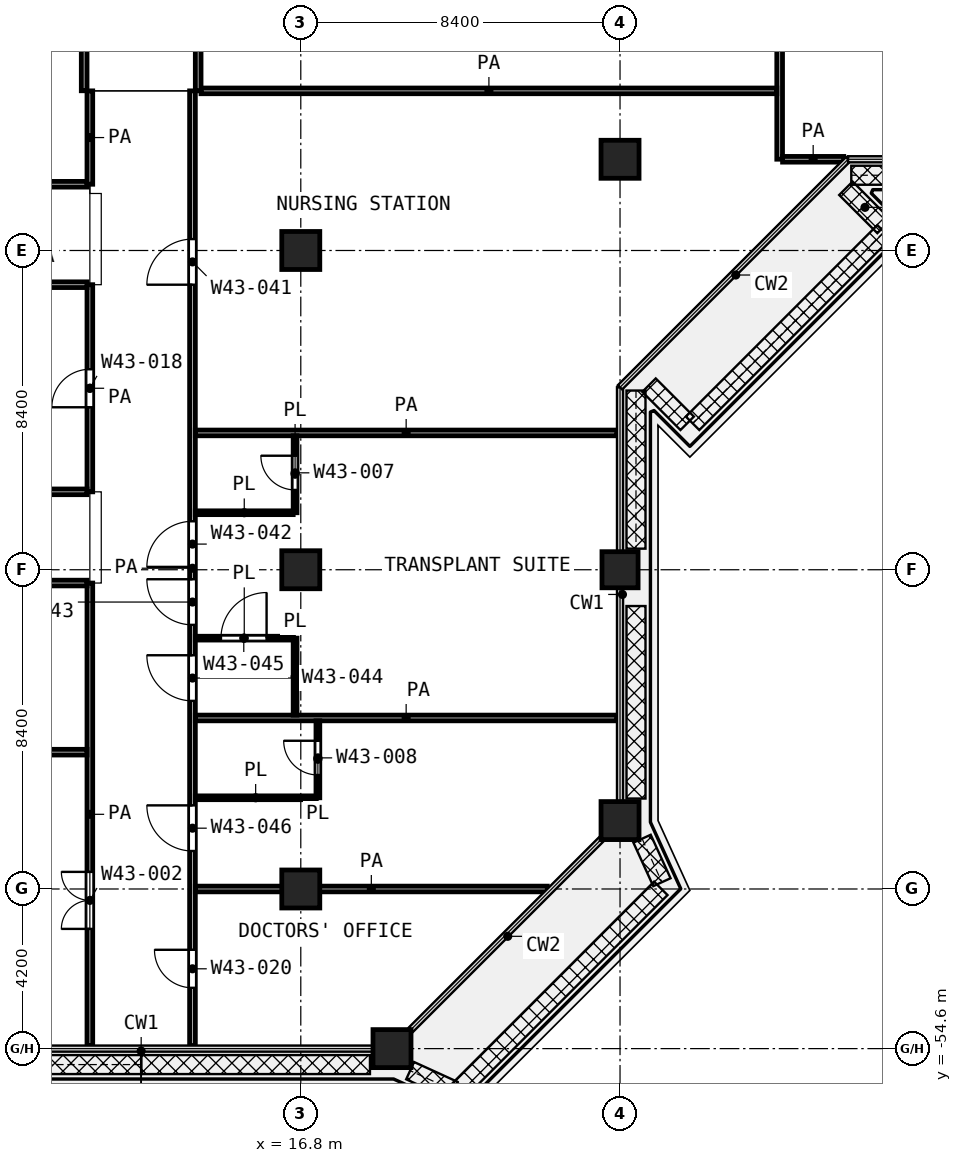
"""IFC4 building model, lengths in metres.
Left out: names, types, materials, properties, quantities, classifications, styles, units other than length and angle.
Written with IfcOpenShell. Run it as: python <this file> out.ifc"""

import sys

from ifc_helpers import new_model, si_unit, direction, frame, frame_2d, origin, origin_2d, place, context, subcontext, project, spatial, rectangle, extrude, element, fill, save


model = new_model("IFC4")
c1 = context("Model", 3, precision=1e-05, world=origin(), true_north=direction((0.0, 1.0)))
c2 = subcontext(c1, "Body", "Model", "MODEL_VIEW")
j1 = project(units=[si_unit("LENGTHUNIT", "METRE"), si_unit("PLANEANGLEUNIT", "RADIAN")], contexts=[c1])
p1 = place(None, origin())
s1 = spatial("IfcSite", under=j1, at=p1, CompositionType="ELEMENT")
p2 = place(p1, origin())
s2 = spatial("IfcBuilding", under=s1, at=p2, CompositionType="ELEMENT")
p3 = place(p2, frame((0.0, 0.0, 208.8)))
s3 = spatial("IfcBuildingStorey", under=s2, at=p3, CompositionType="ELEMENT", Elevation=208.8)
for number, where, z_axis, x_axis in (
    (1, (25.2, -31.2, 0.0), (0.0, 0.0, 1.0), (1.0, 0.0, 0.0)),
    (2, (16.8, -33.6, 0.0), (0.0, 0.0, 1.0), (1.0, 0.0, 0.0)),
    (3, (16.8, -42.0, 0.0), (0.0, 0.0, 1.0), (1.0, 0.0, 0.0)),
):
    element("IfcColumn", number, at=place(p3, frame(where, z_axis=z_axis, x_axis=x_axis)), inside=s3, PredefinedType="COLUMN", context=c2, shape_type="SweptSolid", body=[
        extrude(rectangle(XDim=1.0, YDim=1.0, at=origin_2d()), origin(), (0.0, 0.0, 1.0), 4.2),
    ])
p4 = place(p3, frame((25.2, -42.0, 0.0), z_axis=(0.0, 0.0, 1.0), x_axis=(1.0, 0.0, 0.0)))
e4 = element("IfcColumn", 4, at=p4, inside=s3, PredefinedType="COLUMN", context=c2, shape_type="SweptSolid", body=[
    extrude(rectangle(XDim=0.95, YDim=0.95, at=origin_2d()), origin(), (0.0, 0.0, 1.0), 4.2),
])
for number, where, z_axis, x_axis in (
    (5, (25.2, -48.6, 0.0), (0.0, 0.0, 1.0), (1.0, 0.0, 0.0)),
    (6, (16.8, -50.4, 0.0), (0.0, 0.0, 1.0), (1.0, 0.0, 0.0)),
    (7, (19.2, -54.6, 0.0), (0.0, 0.0, 1.0), (1.0, 0.0, 0.0)),
):
    element("IfcColumn", number, at=place(p3, frame(where, z_axis=z_axis, x_axis=x_axis)), inside=s3, PredefinedType="COLUMN", context=c2, shape_type="SweptSolid", body=[
        extrude(rectangle(XDim=1.0, YDim=1.0, at=origin_2d()), origin(), (0.0, 0.0, 1.0), 4.2),
    ])
p5 = place(p3, frame((14.025, -48.0, 0.0), z_axis=(0.0, 0.0, 1.0), x_axis=(1.0, 0.0, 0.0)))
e8 = element("IfcWall", 8, at=p5, inside=s3, PredefinedType="PARTITIONING", context=c2, shape_type="SweptSolid", body=[
    extrude(rectangle(XDim=3.175, YDim=0.1, at=frame_2d((1.587, 0.0))), origin(), (0.0, 0.0, 1.0), 3.7),
])
p6 = place(p3, frame((14.025, -43.8, 0.0), z_axis=(0.0, 0.0, 1.0), x_axis=(1.0, 0.0, 0.0)))
e9 = element("IfcWall", 9, at=p6, inside=s3, PredefinedType="PARTITIONING", context=c2, shape_type="SweptSolid", body=[
    extrude(rectangle(XDim=2.575, YDim=0.1, at=frame_2d((1.288, 0.0))), origin(), (0.0, 0.0, 1.0), 3.7),
])
p7 = place(p6, frame((0.675, 0.0, 0.0)))
e10 = element("IfcOpeningElement", 10, at=p7, cuts=e9, PredefinedType="OPENING", context=c2, shape_type="SweptSolid", body=[
    extrude(rectangle(XDim=1.2, YDim=2.1, at=frame_2d((0.6, 1.05))), frame((0.0, 0.06, 0.0), z_axis=(0.0, -1.0, 0.0), x_axis=(1.0, 0.0, 0.0)), (0.0, 0.0, 1.0), 0.12),
])
p8 = place(p3, frame((14.025, -40.5, 0.0), z_axis=(0.0, 0.0, 1.0), x_axis=(1.0, 0.0, 0.0)))
e11 = element("IfcWall", 11, at=p8, inside=s3, PredefinedType="PARTITIONING", context=c2, shape_type="SweptSolid", body=[
    extrude(rectangle(XDim=2.575, YDim=0.1, at=frame_2d((1.288, 0.0))), origin(), (0.0, 0.0, 1.0), 3.7),
])
p9 = place(p3, frame((16.65, -45.825, 0.0), z_axis=(0.0, 0.0, 1.0), x_axis=(0.0, 1.0, 0.0)))
e12 = element("IfcWall", 12, at=p9, inside=s3, PredefinedType="PARTITIONING", context=c2, shape_type="SweptSolid", body=[
    extrude(rectangle(XDim=2.025, YDim=0.1, at=frame_2d((1.012, 0.0))), origin(), (0.0, 0.0, 1.0), 3.7),
])
p10 = place(p3, frame((16.65, -40.5, 0.0), z_axis=(0.0, 0.0, 1.0), x_axis=(0.0, 1.0, 0.0)))
e13 = element("IfcWall", 13, at=p10, inside=s3, PredefinedType="PARTITIONING", context=c2, shape_type="SweptSolid", body=[
    extrude(rectangle(XDim=2.025, YDim=0.1, at=frame_2d((1.012, 0.0))), origin(), (0.0, 0.0, 1.0), 3.7),
])
p11 = place(p10, frame((0.6, 0.0, 0.0)))
e14 = element("IfcOpeningElement", 14, at=p11, cuts=e13, PredefinedType="OPENING", context=c2, shape_type="SweptSolid", body=[
    extrude(rectangle(XDim=0.9, YDim=2.1, at=frame_2d((0.45, 1.05))), frame((0.0, 0.06, 0.0), z_axis=(0.0, -1.0, 0.0), x_axis=(1.0, 0.0, 0.0)), (0.0, 0.0, 1.0), 0.12),
])
p12 = place(p3, frame((17.25, -48.0, 0.0), z_axis=(0.0, 0.0, 1.0), x_axis=(0.0, 1.0, 0.0)))
e15 = element("IfcWall", 15, at=p12, inside=s3, PredefinedType="PARTITIONING", context=c2, shape_type="SweptSolid", body=[
    extrude(rectangle(XDim=2.025, YDim=0.1, at=frame_2d((1.012, 0.0))), origin(), (0.0, 0.0, 1.0), 3.7),
])
p13 = place(p12, frame((0.6, 0.0, 0.0)))
e16 = element("IfcOpeningElement", 16, at=p13, cuts=e15, PredefinedType="OPENING", context=c2, shape_type="SweptSolid", body=[
    extrude(rectangle(XDim=0.9, YDim=2.1, at=frame_2d((0.45, 1.05))), frame((0.0, 0.06, 0.0), z_axis=(0.0, -1.0, 0.0), x_axis=(1.0, 0.0, 0.0)), (0.0, 0.0, 1.0), 0.12),
])
p14 = place(p3, frame((14.025, -50.4, 0.0), z_axis=(0.0, 0.0, 1.0), x_axis=(1.0, 0.0, 0.0)))
e17 = element("IfcWall", 17, at=p14, inside=s3, PredefinedType="PARTITIONING", context=c2, shape_type="SweptSolid", body=[
    extrude(rectangle(XDim=9.262, YDim=0.15, at=frame_2d((4.631, 0.0))), origin(), (0.0, 0.0, 1.0), 3.7),
])
p15 = place(p3, frame((0.08, -46.8, 0.0), z_axis=(0.0, 0.0, 1.0), x_axis=(1.0, 0.0, 0.0)))
e18 = element("IfcWall", 18, at=p15, inside=s3, PredefinedType="PARTITIONING", context=c2, shape_type="SweptSolid", body=[
    extrude(rectangle(XDim=11.095, YDim=0.15, at=frame_2d((5.547, 0.0))), origin(), (0.0, 0.0, 1.0), 3.7),
])
p16 = place(p3, frame((14.025, -45.9, 0.0), z_axis=(0.0, 0.0, 1.0), x_axis=(1.0, 0.0, 0.0)))
e19 = element("IfcWall", 19, at=p16, inside=s3, PredefinedType="PARTITIONING", context=c2, shape_type="SweptSolid", body=[
    extrude(rectangle(XDim=11.095, YDim=0.15, at=frame_2d((5.548, 0.0))), origin(), (0.0, 0.0, 1.0), 3.7),
])
p17 = place(p3, frame((2.327, -42.35, 0.0), z_axis=(0.0, 0.0, 1.0), x_axis=(1.0, 0.0, 0.0)))
e20 = element("IfcWall", 20, at=p17, inside=s3, PredefinedType="PARTITIONING", context=c2, shape_type="SweptSolid", body=[
    extrude(rectangle(XDim=8.848, YDim=0.15, at=frame_2d((4.424, 0.0))), origin(), (0.0, 0.0, 1.0), 3.7),
])
p18 = place(p17, frame((3.924, 0.0, 0.0)))
e21 = element("IfcOpeningElement", 21, at=p18, cuts=e20, PredefinedType="OPENING", context=c2, shape_type="SweptSolid", body=[
    extrude(rectangle(XDim=1.0, YDim=2.1, at=frame_2d((0.5, 1.05))), frame((0.0, 0.085, 0.0), z_axis=(0.0, -1.0, 0.0), x_axis=(1.0, 0.0, 0.0)), (0.0, 0.0, 1.0), 0.17),
])
p19 = place(p3, frame((8.65, -39.95, 0.0), z_axis=(0.0, 0.0, 1.0), x_axis=(1.0, 0.0, 0.0)))
e22 = element("IfcWall", 22, at=p19, inside=s3, PredefinedType="PARTITIONING", context=c2, shape_type="SweptSolid", body=[
    extrude(rectangle(XDim=2.525, YDim=0.15, at=frame_2d((1.263, 0.0))), origin(), (0.0, 0.0, 1.0), 3.7),
])
p20 = place(p3, frame((14.025, -38.4, 0.0), z_axis=(0.0, 0.0, 1.0), x_axis=(1.0, 0.0, 0.0)))
e23 = element("IfcWall", 23, at=p20, inside=s3, PredefinedType="PARTITIONING", context=c2, shape_type="SweptSolid", body=[
    extrude(rectangle(XDim=11.095, YDim=0.15, at=frame_2d((5.548, 0.0))), origin(), (0.0, 0.0, 1.0), 3.7),
])
p21 = place(p3, frame((8.9, -34.5, 0.0), z_axis=(0.0, 0.0, 1.0), x_axis=(1.0, 0.0, 0.0)))
e24 = element("IfcWall", 24, at=p21, inside=s3, PredefinedType="PARTITIONING", context=c2, shape_type="SweptSolid", body=[
    extrude(rectangle(XDim=2.275, YDim=0.15, at=frame_2d((1.138, 0.0))), origin(), (0.0, 0.0, 1.0), 3.7),
])
p22 = place(p3, frame((1.077, -31.857, 0.0), z_axis=(0.0, 0.0, 1.0), x_axis=(1.0, 0.0, 0.0)))
e25 = element("IfcWall", 25, at=p22, inside=s3, PredefinedType="PARTITIONING", context=c2, shape_type="SweptSolid", body=[
    extrude(rectangle(XDim=10.098, YDim=0.15, at=frame_2d((5.049, 0.0))), origin(), (0.0, 0.0, 1.0), 3.7),
])
p23 = place(p22, frame((4.449, 0.0, 0.0)))
e26 = element("IfcOpeningElement", 26, at=p23, cuts=e25, PredefinedType="OPENING", context=c2, shape_type="SweptSolid", body=[
    extrude(rectangle(XDim=1.2, YDim=2.1, at=frame_2d((0.6, 1.05))), frame((0.0, 0.085, 0.0), z_axis=(0.0, -1.0, 0.0), x_axis=(1.0, 0.0, 0.0)), (0.0, 0.0, 1.0), 0.17),
])
p24 = place(p3, frame((29.477, -31.2, 0.0), z_axis=(0.0, 0.0, 1.0), x_axis=(1.0, 0.0, 0.0)))
e27 = element("IfcWall", 27, at=p24, inside=s3, PredefinedType="PARTITIONING", context=c2, shape_type="SweptSolid", body=[
    extrude(rectangle(XDim=1.61, YDim=0.15, at=frame_2d((0.805, 0.0))), origin(), (0.0, 0.0, 1.0), 3.7),
])
p25 = place(p3, frame((14.175, -29.4, 0.0), z_axis=(0.0, 0.0, 1.0), x_axis=(1.0, 0.0, 0.0)))
e28 = element("IfcWall", 28, at=p25, inside=s3, PredefinedType="PARTITIONING", context=c2, shape_type="SweptSolid", body=[
    extrude(rectangle(XDim=15.15, YDim=0.15, at=frame_2d((7.575, 0.0))), origin(), (0.0, 0.0, 1.0), 3.7),
])
p26 = place(p3, frame((11.1, -29.397, 0.0), z_axis=(0.0, 0.0, 1.0), x_axis=(0.0, 1.0, 0.0)))
e29 = element("IfcWall", 29, at=p26, inside=s3, PredefinedType="PARTITIONING", context=c2, shape_type="SweptSolid", body=[
    extrude(rectangle(XDim=4.497, YDim=0.15, at=frame_2d((2.249, 0.0))), origin(), (0.0, 0.0, 1.0), 3.7),
])
p27 = place(p3, frame((11.25, -54.52, 0.0), z_axis=(0.0, 0.0, 1.0), x_axis=(0.0, 1.0, 0.0)))
e30 = element("IfcWall", 30, at=p27, inside=s3, PredefinedType="PARTITIONING", context=c2, shape_type="SweptSolid", body=[
    extrude(rectangle(XDim=12.17, YDim=0.15, at=frame_2d((6.085, 0.0))), origin(), (0.0, 0.0, 1.0), 3.7),
])
p28 = place(p27, frame((3.07, 0.0, 0.0)))
e31 = element("IfcOpeningElement", 31, at=p28, cuts=e30, PredefinedType="OPENING", context=c2, shape_type="SweptSolid", body=[
    extrude(rectangle(XDim=1.5, YDim=2.1, at=frame_2d((0.75, 1.05))), frame((0.0, 0.085, 0.0), z_axis=(0.0, -1.0, 0.0), x_axis=(1.0, 0.0, 0.0)), (0.0, 0.0, 1.0), 0.17),
])
p29 = place(p3, frame((11.25, -39.95, 0.0), z_axis=(0.0, 0.0, 1.0), x_axis=(0.0, 1.0, 0.0)))
e32 = element("IfcWall", 32, at=p29, inside=s3, PredefinedType="PARTITIONING", context=c2, shape_type="SweptSolid", body=[
    extrude(rectangle(XDim=5.45, YDim=0.15, at=frame_2d((2.725, 0.0))), origin(), (0.0, 0.0, 1.0), 3.7),
])
p30 = place(p29, frame((2.225, 0.0, 0.0)))
e33 = element("IfcOpeningElement", 33, at=p30, cuts=e32, PredefinedType="OPENING", context=c2, shape_type="SweptSolid", body=[
    extrude(rectangle(XDim=1.0, YDim=2.1, at=frame_2d((0.5, 1.05))), frame((0.0, 0.085, 0.0), z_axis=(0.0, -1.0, 0.0), x_axis=(1.0, 0.0, 0.0)), (0.0, 0.0, 1.0), 0.17),
])
p31 = place(p3, frame((11.25, -31.857, 0.0), z_axis=(0.0, 0.0, 1.0), x_axis=(0.0, 1.0, 0.0)))
e34 = element("IfcWall", 34, at=p31, inside=s3, PredefinedType="PARTITIONING", context=c2, shape_type="SweptSolid", body=[
    extrude(rectangle(XDim=2.457, YDim=0.15, at=frame_2d((1.229, 0.0))), origin(), (0.0, 0.0, 1.0), 3.7),
])
p32 = place(p3, frame((13.95, -54.52, 0.0), z_axis=(0.0, 0.0, 1.0), x_axis=(0.0, 1.0, 0.0)))
e35 = element("IfcWall", 35, at=p32, inside=s3, PredefinedType="PARTITIONING", context=c2, shape_type="SweptSolid", body=[
    extrude(rectangle(XDim=25.12, YDim=0.15, at=frame_2d((12.56, 0.0))), origin(), (0.0, 0.0, 1.0), 3.7),
])
p33 = place(p32, frame((20.02, 0.0, 0.0)))
e36 = element("IfcOpeningElement", 36, at=p33, cuts=e35, PredefinedType="OPENING", context=c2, shape_type="SweptSolid", body=[
    extrude(rectangle(XDim=1.2, YDim=2.1, at=frame_2d((0.6, 1.05))), frame((0.0, 0.085, 0.0), z_axis=(0.0, -1.0, 0.0), x_axis=(1.0, 0.0, 0.0)), (0.0, 0.0, 1.0), 0.17),
])
p34 = place(p32, frame((12.595, 0.0, 0.0)))
e37 = element("IfcOpeningElement", 37, at=p34, cuts=e35, PredefinedType="OPENING", context=c2, shape_type="SweptSolid", body=[
    extrude(rectangle(XDim=1.2, YDim=2.1, at=frame_2d((0.6, 1.05))), frame((0.0, 0.085, 0.0), z_axis=(0.0, -1.0, 0.0), x_axis=(1.0, 0.0, 0.0)), (0.0, 0.0, 1.0), 0.17),
])
p35 = place(p32, frame((11.07, 0.0, 0.0)))
e38 = element("IfcOpeningElement", 38, at=p35, cuts=e35, PredefinedType="OPENING", context=c2, shape_type="SweptSolid", body=[
    extrude(rectangle(XDim=1.2, YDim=2.1, at=frame_2d((0.6, 1.05))), frame((0.0, 0.085, 0.0), z_axis=(0.0, -1.0, 0.0), x_axis=(1.0, 0.0, 0.0)), (0.0, 0.0, 1.0), 0.17),
])
p36 = place(p32, frame((9.07, 0.0, 0.0)))
e39 = element("IfcOpeningElement", 39, at=p36, cuts=e35, PredefinedType="OPENING", context=c2, shape_type="SweptSolid", body=[
    extrude(rectangle(XDim=1.2, YDim=2.1, at=frame_2d((0.6, 1.05))), frame((0.0, 0.085, 0.0), z_axis=(0.0, -1.0, 0.0), x_axis=(1.0, 0.0, 0.0)), (0.0, 0.0, 1.0), 0.17),
])
p37 = place(p32, frame((5.12, 0.0, 0.0)))
e40 = element("IfcOpeningElement", 40, at=p37, cuts=e35, PredefinedType="OPENING", context=c2, shape_type="SweptSolid", body=[
    extrude(rectangle(XDim=1.2, YDim=2.1, at=frame_2d((0.6, 1.05))), frame((0.0, 0.085, 0.0), z_axis=(0.0, -1.0, 0.0), x_axis=(1.0, 0.0, 0.0)), (0.0, 0.0, 1.0), 0.17),
])
p38 = place(p32, frame((1.52, 0.0, 0.0)))
e41 = element("IfcOpeningElement", 41, at=p38, cuts=e35, PredefinedType="OPENING", context=c2, shape_type="SweptSolid", body=[
    extrude(rectangle(XDim=1.0, YDim=2.1, at=frame_2d((0.5, 1.05))), frame((0.0, 0.085, 0.0), z_axis=(0.0, -1.0, 0.0), x_axis=(1.0, 0.0, 0.0)), (0.0, 0.0, 1.0), 0.17),
])
p39 = place(p3, frame((14.1, -29.4, 0.0), z_axis=(0.0, 0.0, 1.0), x_axis=(0.0, 1.0, 0.0)))
e42 = element("IfcWall", 42, at=p39, inside=s3, PredefinedType="PARTITIONING", context=c2, shape_type="SweptSolid", body=[
    extrude(rectangle(XDim=4.5, YDim=0.15, at=frame_2d((2.25, 0.0))), origin(), (0.0, 0.0, 1.0), 3.7),
])
p40 = place(p3, frame((29.4, -31.198, 0.0), z_axis=(0.0, 0.0, 1.0), x_axis=(0.0, 1.0, 0.0)))
e43 = element("IfcWall", 43, at=p40, inside=s3, PredefinedType="PARTITIONING", context=c2, shape_type="SweptSolid", body=[
    extrude(rectangle(XDim=17.098, YDim=0.15, at=frame_2d((8.549, 0.0))), origin(), (0.0, 0.0, 1.0), 3.7),
])
p41 = place(p30, origin())
e44 = element("IfcDoor", 44, at=p41, inside=s3, OperationType="SINGLE_SWING_LEFT", PredefinedType="DOOR", context=c2, shape_type="SweptSolid", body=[
    extrude(rectangle(XDim=1.0, YDim=2.1, at=frame_2d((0.5, 1.05))), frame((0.0, 0.025, 0.0), z_axis=(0.0, -1.0, 0.0), x_axis=(1.0, 0.0, 0.0)), (0.0, 0.0, 1.0), 0.05),
])
fill(e33, e44)
p42 = place(p28, origin())
e45 = element("IfcDoor", 45, at=p42, inside=s3, OperationType="DOUBLE_DOOR_SINGLE_SWING", PredefinedType="DOOR", context=c2, shape_type="SweptSolid", body=[
    extrude(rectangle(XDim=1.5, YDim=2.1, at=frame_2d((0.75, 1.05))), frame((0.0, 0.025, 0.0), z_axis=(0.0, -1.0, 0.0), x_axis=(1.0, 0.0, 0.0)), (0.0, 0.0, 1.0), 0.05),
])
fill(e31, e45)
p43 = place(p33, origin())
e46 = element("IfcDoor", 46, at=p43, inside=s3, OperationType="SINGLE_SWING_LEFT", PredefinedType="DOOR", context=c2, shape_type="SweptSolid", body=[
    extrude(rectangle(XDim=1.2, YDim=2.1, at=frame_2d((0.6, 1.05))), frame((0.0, 0.025, 0.0), z_axis=(0.0, -1.0, 0.0), x_axis=(1.0, 0.0, 0.0)), (0.0, 0.0, 1.0), 0.05),
])
fill(e36, e46)
p44 = place(p34, origin())
e47 = element("IfcDoor", 47, at=p44, inside=s3, OperationType="SINGLE_SWING_LEFT", PredefinedType="DOOR", context=c2, shape_type="SweptSolid", body=[
    extrude(rectangle(XDim=1.2, YDim=2.1, at=frame_2d((0.6, 1.05))), frame((0.0, 0.025, 0.0), z_axis=(0.0, -1.0, 0.0), x_axis=(1.0, 0.0, 0.0)), (0.0, 0.0, 1.0), 0.05),
])
fill(e37, e47)
p45 = place(p35, origin())
e48 = element("IfcDoor", 48, at=p45, inside=s3, OperationType="SINGLE_SWING_RIGHT", PredefinedType="DOOR", context=c2, shape_type="SweptSolid", body=[
    extrude(rectangle(XDim=1.2, YDim=2.1, at=frame_2d((0.6, 1.05))), frame((0.0, 0.025, 0.0), z_axis=(0.0, -1.0, 0.0), x_axis=(1.0, 0.0, 0.0)), (0.0, 0.0, 1.0), 0.05),
])
fill(e38, e48)
p46 = place(p36, origin())
e49 = element("IfcDoor", 49, at=p46, inside=s3, OperationType="SINGLE_SWING_RIGHT", PredefinedType="DOOR", context=c2, shape_type="SweptSolid", body=[
    extrude(rectangle(XDim=1.2, YDim=2.1, at=frame_2d((0.6, 1.05))), frame((0.0, 0.025, 0.0), z_axis=(0.0, -1.0, 0.0), x_axis=(1.0, 0.0, 0.0)), (0.0, 0.0, 1.0), 0.05),
])
fill(e39, e49)
p47 = place(p7, origin())
e50 = element("IfcDoor", 50, at=p47, inside=s3, OperationType="SINGLE_SWING_RIGHT", PredefinedType="DOOR", context=c2, shape_type="SweptSolid", body=[
    extrude(rectangle(XDim=1.2, YDim=2.1, at=frame_2d((0.6, 1.05))), frame((0.0, 0.025, 0.0), z_axis=(0.0, -1.0, 0.0), x_axis=(1.0, 0.0, 0.0)), (0.0, 0.0, 1.0), 0.05),
])
fill(e10, e50)
p48 = place(p11, origin())
e51 = element("IfcDoor", 51, at=p48, inside=s3, OperationType="SINGLE_SWING_RIGHT", PredefinedType="DOOR", context=c2, shape_type="SweptSolid", body=[
    extrude(rectangle(XDim=0.9, YDim=2.1, at=frame_2d((0.45, 1.05))), frame((0.0, 0.025, 0.0), z_axis=(0.0, -1.0, 0.0), x_axis=(1.0, 0.0, 0.0)), (0.0, 0.0, 1.0), 0.05),
])
fill(e14, e51)
p49 = place(p37, origin())
e52 = element("IfcDoor", 52, at=p49, inside=s3, OperationType="SINGLE_SWING_RIGHT", PredefinedType="DOOR", context=c2, shape_type="SweptSolid", body=[
    extrude(rectangle(XDim=1.2, YDim=2.1, at=frame_2d((0.6, 1.05))), frame((0.0, 0.025, 0.0), z_axis=(0.0, -1.0, 0.0), x_axis=(1.0, 0.0, 0.0)), (0.0, 0.0, 1.0), 0.05),
])
fill(e40, e52)
p50 = place(p13, origin())
e53 = element("IfcDoor", 53, at=p50, inside=s3, OperationType="SINGLE_SWING_RIGHT", PredefinedType="DOOR", context=c2, shape_type="SweptSolid", body=[
    extrude(rectangle(XDim=0.9, YDim=2.1, at=frame_2d((0.45, 1.05))), frame((0.0, 0.025, 0.0), z_axis=(0.0, -1.0, 0.0), x_axis=(1.0, 0.0, 0.0)), (0.0, 0.0, 1.0), 0.05),
])
fill(e16, e53)
p51 = place(p38, origin())
e54 = element("IfcDoor", 54, at=p51, inside=s3, OperationType="SINGLE_SWING_RIGHT", PredefinedType="DOOR", context=c2, shape_type="SweptSolid", body=[
    extrude(rectangle(XDim=1.0, YDim=2.1, at=frame_2d((0.5, 1.05))), frame((0.0, 0.025, 0.0), z_axis=(0.0, -1.0, 0.0), x_axis=(1.0, 0.0, 0.0)), (0.0, 0.0, 1.0), 0.05),
])
fill(e41, e54)
save(model, sys.argv[1])
